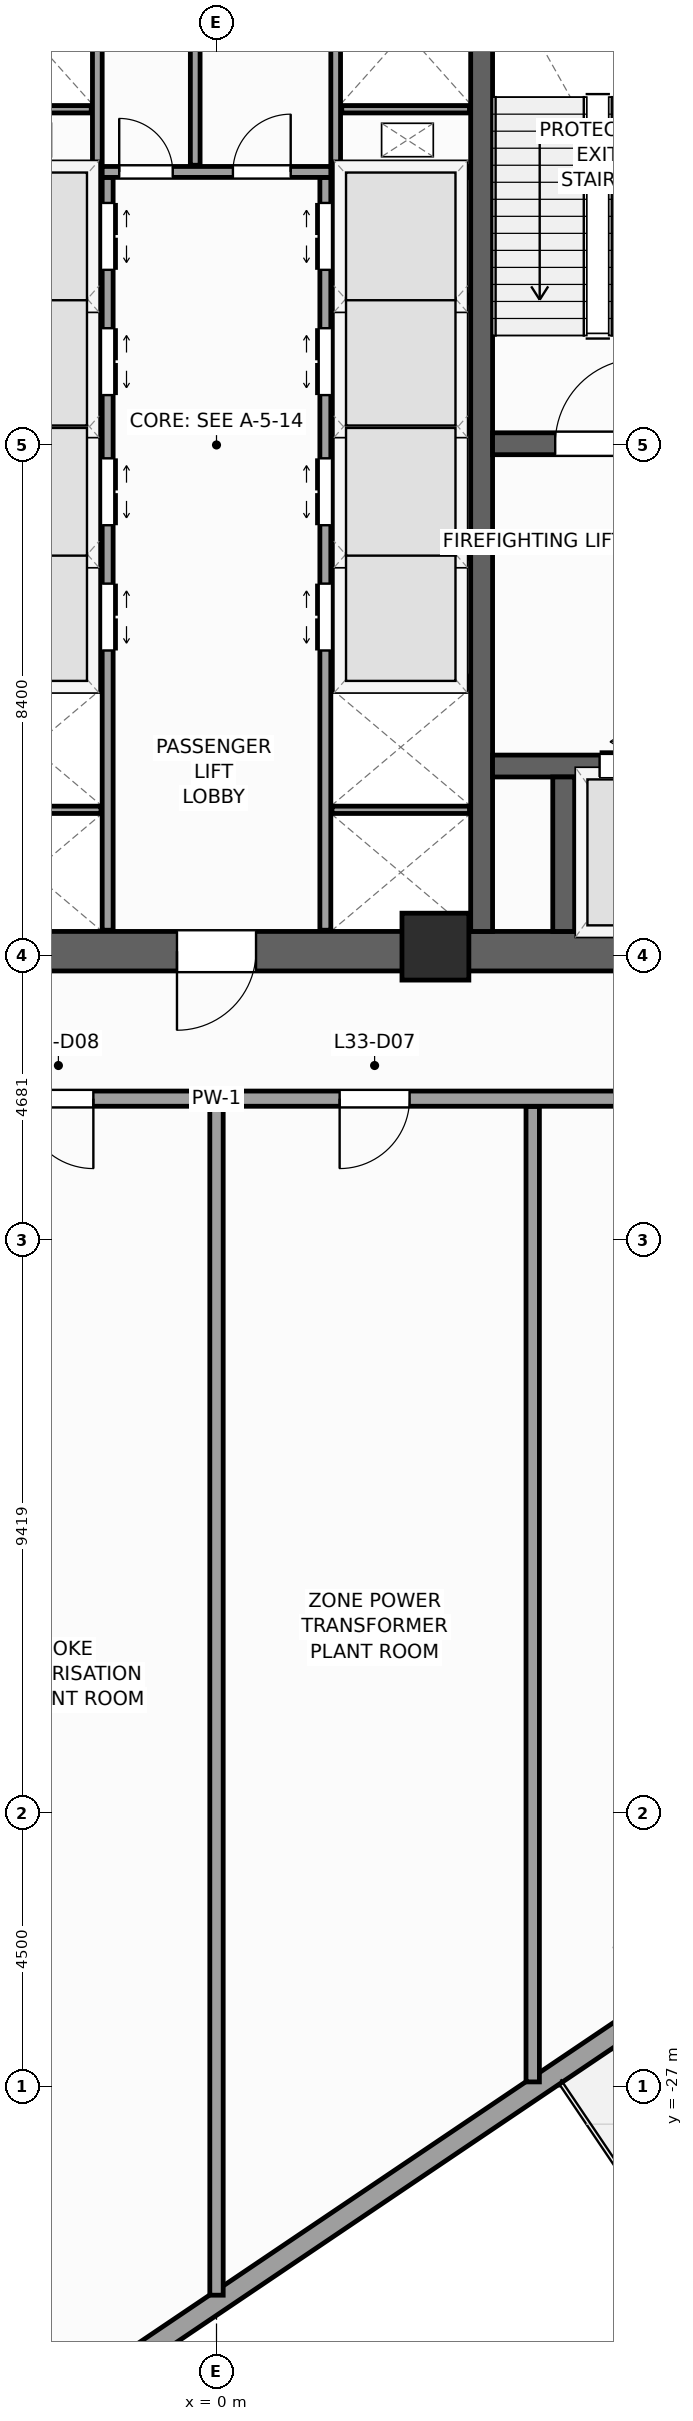
"""IFC4 building model, lengths in metres.
Left out: names, types, materials, properties, quantities, classifications, styles, units other than length and angle.
Written with IfcOpenShell. Run it as: python <this file> out.ifc"""

import sys

from ifc_helpers import new_model, si_unit, direction, frame, frame_2d, origin, origin_2d, place, context, subcontext, project, spatial, rectangle, extrude, source, transform, mapped, element, fill, save


model = new_model("IFC4")
c1 = context("Model", 3, precision=1e-05, world=origin(), true_north=direction((0.0, 1.0)))
c2 = subcontext(c1, "Body", "Model", "MODEL_VIEW")
j1 = project(units=[si_unit("LENGTHUNIT", "METRE"), si_unit("PLANEANGLEUNIT", "RADIAN")], contexts=[c1])
p1 = place(None, origin())
s1 = spatial("IfcSite", under=j1, at=p1, CompositionType="ELEMENT")
p2 = place(p1, origin())
s2 = spatial("IfcBuilding", under=s1, at=p2, CompositionType="ELEMENT")
p3 = place(p2, frame((0.0, 0.0, 139.2)))
s3 = spatial("IfcBuildingStorey", under=s2, at=p3, CompositionType="ELEMENT", Elevation=139.2)
p4 = place(p3, frame((-8.65, -8.325, 0.0), z_axis=(0.0, 0.0, 1.0), x_axis=(1.0, 0.0, 0.0)))
e1 = element("IfcWall", 1, at=p4, inside=s3, PredefinedType="SHEAR", context=c2, shape_type="SweptSolid", body=[
    extrude(rectangle(XDim=17.3, YDim=0.65, at=frame_2d((8.65, 0.0))), origin(), (0.0, 0.0, 1.0), 5.2),
])
p5 = place(p4, frame((8.0, 0.0, 0.0)))
e2 = element("IfcOpeningElement", 2, at=p5, cuts=e1, PredefinedType="OPENING", context=c2, shape_type="SweptSolid", body=[
    extrude(rectangle(XDim=1.3, YDim=2.2, at=frame_2d((0.65, 1.1))), frame((0.0, 0.335, 0.0), z_axis=(0.0, -1.0, 0.0), x_axis=(1.0, 0.0, 0.0)), (0.0, 0.0, 1.0), 0.67),
])
p6 = place(p3, frame((4.36, -8.0, 0.0), z_axis=(0.0, 0.0, 1.0), x_axis=(0.0, 1.0, 0.0)))
e3 = element("IfcWall", 3, at=p6, inside=s3, PredefinedType="SHEAR", context=c2, shape_type="SweptSolid", body=[
    extrude(rectangle(XDim=16.0, YDim=0.36, at=frame_2d((8.0, 0.0))), origin(), (0.0, 0.0, 1.0), 5.2),
])
p7 = place(p3, frame((4.54, 0.02, 0.0), z_axis=(0.0, 0.0, 1.0), x_axis=(1.0, 0.0, 0.0)))
e4 = element("IfcWall", 4, at=p7, inside=s3, PredefinedType="SHEAR", context=c2, shape_type="SweptSolid", body=[
    extrude(rectangle(XDim=3.46, YDim=0.36, at=frame_2d((1.73, 0.0))), origin(), (0.0, 0.0, 1.0), 5.2),
])
p8 = place(p7, frame((1.03, 0.0, 0.0)))
e5 = element("IfcOpeningElement", 5, at=p8, cuts=e4, PredefinedType="OPENING", context=c2, shape_type="SweptSolid", body=[
    extrude(rectangle(XDim=1.4, YDim=2.2, at=frame_2d((0.7, 1.1))), frame((0.0, 0.19, 0.0), z_axis=(0.0, -1.0, 0.0), x_axis=(1.0, 0.0, 0.0)), (0.0, 0.0, 1.0), 0.38),
])
p9 = place(p3, frame((4.54, -5.28, 0.0), z_axis=(0.0, 0.0, 1.0), x_axis=(1.0, 0.0, 0.0)))
e6 = element("IfcWall", 6, at=p9, inside=s3, PredefinedType="SHEAR", context=c2, shape_type="SweptSolid", body=[
    extrude(rectangle(XDim=3.46, YDim=0.36, at=frame_2d((1.73, 0.0))), origin(), (0.0, 0.0, 1.0), 5.2),
])
p10 = place(p9, frame((1.76, 0.0, 0.0)))
e7 = element("IfcOpeningElement", 7, at=p10, cuts=e6, PredefinedType="OPENING", context=c2, shape_type="SweptSolid", body=[
    extrude(rectangle(XDim=1.2, YDim=2.25, at=frame_2d((0.6, 1.125))), frame((0.0, 0.19, 0.0), z_axis=(0.0, -1.0, 0.0), x_axis=(1.0, 0.0, 0.0)), (0.0, 0.0, 1.0), 0.38),
])
p11 = place(p3, frame((5.71, -8.0, 0.0), z_axis=(0.0, 0.0, 1.0), x_axis=(0.0, 1.0, 0.0)))
e8 = element("IfcWall", 8, at=p11, inside=s3, PredefinedType="SHEAR", context=c2, shape_type="SweptSolid", body=[
    extrude(rectangle(XDim=2.54, YDim=0.36, at=frame_2d((1.27, 0.0))), origin(), (0.0, 0.0, 1.0), 5.2),
])
m1 = source(origin(), c2, "Body", "SweptSolid", [
    extrude(rectangle(XDim=1.1, YDim=1.1, at=origin_2d()), origin(), (0.0, 0.0, 1.0), 5.2),
])
p12 = place(p3, frame((3.6, -8.25, 0.0), z_axis=(0.0, 0.0, 1.0), x_axis=(1.0, 0.0, 0.0)))
e9 = element("IfcColumn", 9, at=p12, inside=s3, PredefinedType="PILASTER", context=c2, shape_type="MappedRepresentation", body=[
    mapped(m1, transform((0.0, 0.0, 0.0), scale=1.0)),
])
p13 = place(p3, frame((-5.486, -28.223, 0.0), z_axis=(0.0, 0.0, 1.0), x_axis=(0.559171107879, -0.82905227345, 0.0)))
e10 = element("IfcWall", 10, at=p13, inside=s3, PredefinedType="STANDARD", context=c2, shape_type="SweptSolid", body=[
    extrude(rectangle(XDim=5.17, YDim=0.34, at=frame_2d((2.585, 0.0))), origin(), (0.0, 0.0, 1.0), 4.24),
])
p14 = place(p3, frame((-2.972, -32.558, 0.0), z_axis=(0.0, 0.0, 1.0), x_axis=(0.82903231094, 0.559200704056, 0.0)))
e11 = element("IfcWall", 11, at=p14, inside=s3, PredefinedType="STANDARD", context=c2, shape_type="SweptSolid", body=[
    extrude(rectangle(XDim=15.27, YDim=0.34, at=frame_2d((7.635, 0.0))), origin(), (0.0, 0.0, 1.0), 4.34),
])
p15 = place(p14, frame((12.27, 0.0, 0.0)))
e12 = element("IfcOpeningElement", 12, at=p15, cuts=e11, PredefinedType="OPENING", context=c2, shape_type="SweptSolid", body=[
    extrude(rectangle(XDim=1.2, YDim=2.3, at=frame_2d((0.6, 1.15))), frame((0.0, 0.18, 0.0), z_axis=(0.0, -1.0, 0.0), x_axis=(1.0, 0.0, 0.0)), (0.0, 0.0, 1.0), 0.36),
])
p16 = place(p3, frame((-1.79, -7.98, 0.0), z_axis=(0.0, 0.0, 1.0), x_axis=(0.0, 1.0, 0.0)))
e13 = element("IfcWall", 13, at=p16, inside=s3, PredefinedType="PARTITIONING", context=c2, shape_type="SweptSolid", body=[
    extrude(rectangle(XDim=12.38, YDim=0.18, at=frame_2d((6.19, 0.0))), origin(), (0.0, 0.0, 1.0), 4.94),
])
p17 = place(p16, frame((4.6, 0.0, 0.0)))
e14 = element("IfcOpeningElement", 14, at=p17, cuts=e13, PredefinedType="OPENING", context=c2, shape_type="SweptSolid", body=[
    extrude(rectangle(XDim=1.1, YDim=2.2, at=frame_2d((0.55, 1.1))), frame((0.0, 0.1, 0.0), z_axis=(0.0, -1.0, 0.0), x_axis=(1.0, 0.0, 0.0)), (0.0, 0.0, 1.0), 0.2),
])
p18 = place(p16, frame((6.66, 0.0, 0.0)))
e15 = element("IfcOpeningElement", 15, at=p18, cuts=e13, PredefinedType="OPENING", context=c2, shape_type="SweptSolid", body=[
    extrude(rectangle(XDim=1.1, YDim=2.2, at=frame_2d((0.55, 1.1))), frame((0.0, 0.1, 0.0), z_axis=(0.0, -1.0, 0.0), x_axis=(1.0, 0.0, 0.0)), (0.0, 0.0, 1.0), 0.2),
])
p19 = place(p16, frame((8.8, 0.0, 0.0)))
e16 = element("IfcOpeningElement", 16, at=p19, cuts=e13, PredefinedType="OPENING", context=c2, shape_type="SweptSolid", body=[
    extrude(rectangle(XDim=1.1, YDim=2.2, at=frame_2d((0.55, 1.1))), frame((0.0, 0.1, 0.0), z_axis=(0.0, -1.0, 0.0), x_axis=(1.0, 0.0, 0.0)), (0.0, 0.0, 1.0), 0.2),
])
p20 = place(p16, frame((10.86, 0.0, 0.0)))
e17 = element("IfcOpeningElement", 17, at=p20, cuts=e13, PredefinedType="OPENING", context=c2, shape_type="SweptSolid", body=[
    extrude(rectangle(XDim=1.1, YDim=2.2, at=frame_2d((0.55, 1.1))), frame((0.0, 0.1, 0.0), z_axis=(0.0, -1.0, 0.0), x_axis=(1.0, 0.0, 0.0)), (0.0, 0.0, 1.0), 0.2),
])
p21 = place(p3, frame((1.79, -7.98, 0.0), z_axis=(0.0, 0.0, 1.0), x_axis=(0.0, 1.0, 0.0)))
e18 = element("IfcWall", 18, at=p21, inside=s3, PredefinedType="PARTITIONING", context=c2, shape_type="SweptSolid", body=[
    extrude(rectangle(XDim=12.38, YDim=0.18, at=frame_2d((6.19, 0.0))), origin(), (0.0, 0.0, 1.0), 4.94),
])
p22 = place(p21, frame((4.6, 0.0, 0.0)))
e19 = element("IfcOpeningElement", 19, at=p22, cuts=e18, PredefinedType="OPENING", context=c2, shape_type="SweptSolid", body=[
    extrude(rectangle(XDim=1.1, YDim=2.2, at=frame_2d((0.55, 1.1))), frame((0.0, 0.1, 0.0), z_axis=(0.0, -1.0, 0.0), x_axis=(1.0, 0.0, 0.0)), (0.0, 0.0, 1.0), 0.2),
])
p23 = place(p21, frame((6.66, 0.0, 0.0)))
e20 = element("IfcOpeningElement", 20, at=p23, cuts=e18, PredefinedType="OPENING", context=c2, shape_type="SweptSolid", body=[
    extrude(rectangle(XDim=1.1, YDim=2.2, at=frame_2d((0.55, 1.1))), frame((0.0, 0.1, 0.0), z_axis=(0.0, -1.0, 0.0), x_axis=(1.0, 0.0, 0.0)), (0.0, 0.0, 1.0), 0.2),
])
p24 = place(p21, frame((8.8, 0.0, 0.0)))
e21 = element("IfcOpeningElement", 21, at=p24, cuts=e18, PredefinedType="OPENING", context=c2, shape_type="SweptSolid", body=[
    extrude(rectangle(XDim=1.1, YDim=2.2, at=frame_2d((0.55, 1.1))), frame((0.0, 0.1, 0.0), z_axis=(0.0, -1.0, 0.0), x_axis=(1.0, 0.0, 0.0)), (0.0, 0.0, 1.0), 0.2),
])
p25 = place(p21, frame((10.86, 0.0, 0.0)))
e22 = element("IfcOpeningElement", 22, at=p25, cuts=e18, PredefinedType="OPENING", context=c2, shape_type="SweptSolid", body=[
    extrude(rectangle(XDim=1.1, YDim=2.2, at=frame_2d((0.55, 1.1))), frame((0.0, 0.1, 0.0), z_axis=(0.0, -1.0, 0.0), x_axis=(1.0, 0.0, 0.0)), (0.0, 0.0, 1.0), 0.2),
])
p26 = place(p3, frame((-1.88, 4.49, 0.0), z_axis=(0.0, 0.0, 1.0), x_axis=(1.0, 0.0, 0.0)))
e23 = element("IfcWall", 23, at=p26, inside=s3, PredefinedType="PARTITIONING", context=c2, shape_type="SweptSolid", body=[
    extrude(rectangle(XDim=3.76, YDim=0.18, at=frame_2d((1.88, 0.0))), origin(), (0.0, 0.0, 1.0), 4.94),
])
p27 = place(p26, frame((0.28, 0.0, 0.0)))
e24 = element("IfcOpeningElement", 24, at=p27, cuts=e23, PredefinedType="OPENING", context=c2, shape_type="SweptSolid", body=[
    extrude(rectangle(XDim=0.88, YDim=2.1, at=frame_2d((0.44, 1.05))), frame((0.0, 0.1, 0.0), z_axis=(0.0, -1.0, 0.0), x_axis=(1.0, 0.0, 0.0)), (0.0, 0.0, 1.0), 0.2),
])
p28 = place(p26, frame((2.15, 0.0, 0.0)))
e25 = element("IfcOpeningElement", 25, at=p28, cuts=e23, PredefinedType="OPENING", context=c2, shape_type="SweptSolid", body=[
    extrude(rectangle(XDim=0.95, YDim=2.1, at=frame_2d((0.475, 1.05))), frame((0.0, 0.1, 0.0), z_axis=(0.0, -1.0, 0.0), x_axis=(1.0, 0.0, 0.0)), (0.0, 0.0, 1.0), 0.2),
])
for number, where, z_axis, x_axis in (
    (26, (-4.17, -3.9, 0.0), (0.0, 0.0, 1.0), (1.0, 0.0, 0.0)),
    (27, (1.89, -3.9, 0.0), (0.0, 0.0, 1.0), (1.0, 0.0, 0.0)),
    (28, (-4.17, 0.3, 0.0), (0.0, 0.0, 1.0), (1.0, 0.0, 0.0)),
    (29, (1.89, 0.3, 0.0), (0.0, 0.0, 1.0), (1.0, 0.0, 0.0)),
    (30, (-4.17, 4.49, 0.0), (0.0, 0.0, 1.0), (1.0, 0.0, 0.0)),
    (31, (1.89, 4.49, 0.0), (0.0, 0.0, 1.0), (1.0, 0.0, 0.0)),
):
    element("IfcWall", number, at=place(p3, frame(where, z_axis=z_axis, x_axis=x_axis)), inside=s3, PredefinedType="PARTITIONING", context=c2, shape_type="SweptSolid", body=[
        extrude(rectangle(XDim=2.28, YDim=0.18, at=frame_2d((1.14, 0.0))), origin(), (0.0, 0.0, 1.0), 4.94),
    ])
for number, where, z_axis, x_axis in (
    (32, (-4.16, -6.0, 0.0), (0.0, 0.0, 1.0), (1.0, 0.0, 0.0)),
    (33, (1.9, -6.0, 0.0), (0.0, 0.0, 1.0), (1.0, 0.0, 0.0)),
    (34, (-4.16, -1.8, 0.0), (0.0, 0.0, 1.0), (1.0, 0.0, 0.0)),
    (35, (1.9, -1.8, 0.0), (0.0, 0.0, 1.0), (1.0, 0.0, 0.0)),
    (36, (-4.16, 2.4, 0.0), (0.0, 0.0, 1.0), (1.0, 0.0, 0.0)),
    (37, (1.9, 2.4, 0.0), (0.0, 0.0, 1.0), (1.0, 0.0, 0.0)),
):
    element("IfcWall", number, at=place(p3, frame(where, z_axis=z_axis, x_axis=x_axis)), inside=s3, PredefinedType="PARTITIONING", context=c2, shape_type="SweptSolid", body=[
        extrude(rectangle(XDim=2.26, YDim=0.12, at=frame_2d((1.13, 0.0))), origin(), (0.0, 0.0, 1.0), 4.94),
    ])
for number, where, z_axis, x_axis in (
    (38, (-1.96, 4.58, 0.0), (0.0, 0.0, 1.0), (0.0, 1.0, 0.0)),
    (39, (1.96, 4.58, 0.0), (0.0, 0.0, 1.0), (0.0, 1.0, 0.0)),
):
    element("IfcWall", number, at=place(p3, frame(where, z_axis=z_axis, x_axis=x_axis)), inside=s3, PredefinedType="PARTITIONING", context=c2, shape_type="SweptSolid", body=[
        extrude(rectangle(XDim=3.4, YDim=0.16, at=frame_2d((1.7, 0.0))), origin(), (0.0, 0.0, 1.0), 4.94),
    ])
for number, where, z_axis, x_axis in (
    (40, (-4.16, 5.52, 0.0), (0.0, 0.0, 1.0), (1.0, 0.0, 0.0)),
    (41, (2.06, 5.52, 0.0), (0.0, 0.0, 1.0), (1.0, 0.0, 0.0)),
):
    element("IfcWall", number, at=place(p3, frame(where, z_axis=z_axis, x_axis=x_axis)), inside=s3, PredefinedType="PARTITIONING", context=c2, shape_type="SweptSolid", body=[
        extrude(rectangle(XDim=2.1, YDim=0.12, at=frame_2d((1.05, 0.0))), origin(), (0.0, 0.0, 1.0), 4.94),
    ])
p29 = place(p3, frame((-0.35, 4.6, 0.0), z_axis=(0.0, 0.0, 1.0), x_axis=(0.0, 1.0, 0.0)))
e42 = element("IfcWall", 42, at=p29, inside=s3, PredefinedType="PARTITIONING", context=c2, shape_type="SweptSolid", body=[
    extrude(rectangle(XDim=3.38, YDim=0.16, at=frame_2d((1.69, 0.0))), origin(), (0.0, 0.0, 1.0), 4.94),
])
p30 = place(p3, frame((-10.75, -10.75, 0.0), z_axis=(0.0, 0.0, 1.0), x_axis=(1.0, 0.0, 0.0)))
e43 = element("IfcWall", 43, at=p30, inside=s3, PredefinedType="PARTITIONING", context=c2, shape_type="SweptSolid", body=[
    extrude(rectangle(XDim=21.5, YDim=0.25, at=frame_2d((10.75, 0.0))), origin(), (0.0, 0.0, 1.0), 4.94),
])
p31 = place(p30, frame((17.986, 0.0, 0.0)))
e44 = element("IfcOpeningElement", 44, at=p31, cuts=e43, PredefinedType="OPENING", context=c2, shape_type="SweptSolid", body=[
    extrude(rectangle(XDim=1.15, YDim=2.25, at=frame_2d((0.575, 1.125))), frame((0.0, 0.135, 0.0), z_axis=(0.0, -1.0, 0.0), x_axis=(1.0, 0.0, 0.0)), (0.0, 0.0, 1.0), 0.27),
])
p32 = place(p30, frame((12.775, 0.0, 0.0)))
e45 = element("IfcOpeningElement", 45, at=p32, cuts=e43, PredefinedType="OPENING", context=c2, shape_type="SweptSolid", body=[
    extrude(rectangle(XDim=1.15, YDim=2.25, at=frame_2d((0.575, 1.125))), frame((0.0, 0.135, 0.0), z_axis=(0.0, -1.0, 0.0), x_axis=(1.0, 0.0, 0.0)), (0.0, 0.0, 1.0), 0.27),
])
p33 = place(p30, frame((7.575, 0.0, 0.0)))
e46 = element("IfcOpeningElement", 46, at=p33, cuts=e43, PredefinedType="OPENING", context=c2, shape_type="SweptSolid", body=[
    extrude(rectangle(XDim=1.15, YDim=2.25, at=frame_2d((0.575, 1.125))), frame((0.0, 0.135, 0.0), z_axis=(0.0, -1.0, 0.0), x_axis=(1.0, 0.0, 0.0)), (0.0, 0.0, 1.0), 0.27),
])
p34 = place(p30, frame((2.365, 0.0, 0.0)))
e47 = element("IfcOpeningElement", 47, at=p34, cuts=e43, PredefinedType="OPENING", context=c2, shape_type="SweptSolid", body=[
    extrude(rectangle(XDim=1.15, YDim=2.25, at=frame_2d((0.575, 1.125))), frame((0.0, 0.135, 0.0), z_axis=(0.0, -1.0, 0.0), x_axis=(1.0, 0.0, 0.0)), (0.0, 0.0, 1.0), 0.27),
])
p35 = place(p3, frame((0.0, -10.88, 0.0), z_axis=(0.0, 0.0, 1.0), x_axis=(0.0, -1.0, 0.0)))
e48 = element("IfcWall", 48, at=p35, inside=s3, PredefinedType="PARTITIONING", context=c2, shape_type="SweptSolid", body=[
    extrude(rectangle(XDim=19.547, YDim=0.22, at=frame_2d((9.773, 0.0))), origin(), (0.0, 0.0, 1.0), 4.94),
])
p36 = place(p3, frame((5.2, -10.88, 0.0), z_axis=(0.0, 0.0, 1.0), x_axis=(0.0, -1.0, 0.0)))
e49 = element("IfcWall", 49, at=p36, inside=s3, PredefinedType="PARTITIONING", context=c2, shape_type="SweptSolid", body=[
    extrude(rectangle(XDim=16.04, YDim=0.22, at=frame_2d((8.02, 0.0))), origin(), (0.0, 0.0, 1.0), 4.94),
])
m2 = source(origin(), c2, "Body", "SweptSolid", [
    extrude(rectangle(XDim=1.4, YDim=2.2, at=frame_2d((0.7, 1.1))), frame((0.0, 0.025, 0.0), z_axis=(0.0, -1.0, 0.0), x_axis=(1.0, 0.0, 0.0)), (0.0, 0.0, 1.0), 0.05),
])
p37 = place(p8, origin())
e50 = element("IfcDoor", 50, at=p37, inside=s3, OperationType="SINGLE_SWING_RIGHT", PredefinedType="DOOR", context=c2, shape_type="MappedRepresentation", body=[
    mapped(m2, transform((0.0, 0.0, 0.0), scale=1.0)),
])
fill(e5, e50)
m3 = source(origin(), c2, "Body", "SweptSolid", [
    extrude(rectangle(XDim=1.3, YDim=2.2, at=frame_2d((0.65, 1.1))), frame((0.0, 0.025, 0.0), z_axis=(0.0, -1.0, 0.0), x_axis=(1.0, 0.0, 0.0)), (0.0, 0.0, 1.0), 0.05),
])
p38 = place(p5, frame((1.3, 0.0, 0.0), z_axis=(0.0, 0.0, 1.0), x_axis=(-1.0, 0.0, 0.0)))
e51 = element("IfcDoor", 51, at=p38, inside=s3, OperationType="SINGLE_SWING_LEFT", PredefinedType="DOOR", context=c2, shape_type="MappedRepresentation", body=[
    mapped(m3, transform((0.0, 0.0, 0.0), scale=1.0)),
])
fill(e2, e51)
m4 = source(origin(), c2, "Body", "SweptSolid", [
    extrude(rectangle(XDim=1.2, YDim=2.25, at=frame_2d((0.6, 1.125))), frame((0.0, 0.025, 0.0), z_axis=(0.0, -1.0, 0.0), x_axis=(1.0, 0.0, 0.0)), (0.0, 0.0, 1.0), 0.05),
])
p39 = place(p10, origin())
e52 = element("IfcDoor", 52, at=p39, inside=s3, OperationType="DOUBLE_DOOR_SLIDING", PredefinedType="DOOR", context=c2, shape_type="MappedRepresentation", body=[
    mapped(m4, transform((0.0, 0.0, 0.0), scale=1.0)),
])
fill(e7, e52)
m5 = source(origin(), c2, "Body", "SweptSolid", [
    extrude(rectangle(XDim=1.1, YDim=2.2, at=frame_2d((0.55, 1.1))), frame((0.0, 0.025, 0.0), z_axis=(0.0, -1.0, 0.0), x_axis=(1.0, 0.0, 0.0)), (0.0, 0.0, 1.0), 0.05),
])
p40 = place(p17, frame((1.1, 0.0, 0.0), z_axis=(0.0, 0.0, 1.0), x_axis=(-1.0, 0.0, 0.0)))
e53 = element("IfcDoor", 53, at=p40, inside=s3, OperationType="DOUBLE_DOOR_SLIDING", PredefinedType="DOOR", context=c2, shape_type="MappedRepresentation", body=[
    mapped(m5, transform((0.0, 0.0, 0.0), scale=1.0)),
])
fill(e14, e53)
p41 = place(p18, frame((1.1, 0.0, 0.0), z_axis=(0.0, 0.0, 1.0), x_axis=(-1.0, 0.0, 0.0)))
e54 = element("IfcDoor", 54, at=p41, inside=s3, OperationType="DOUBLE_DOOR_SLIDING", PredefinedType="DOOR", context=c2, shape_type="MappedRepresentation", body=[
    mapped(m5, transform((0.0, 0.0, 0.0), scale=1.0)),
])
fill(e15, e54)
p42 = place(p22, origin())
e55 = element("IfcDoor", 55, at=p42, inside=s3, OperationType="DOUBLE_DOOR_SLIDING", PredefinedType="DOOR", context=c2, shape_type="MappedRepresentation", body=[
    mapped(m5, transform((0.0, 0.0, 0.0), scale=1.0)),
])
fill(e19, e55)
p43 = place(p23, origin())
e56 = element("IfcDoor", 56, at=p43, inside=s3, OperationType="DOUBLE_DOOR_SLIDING", PredefinedType="DOOR", context=c2, shape_type="MappedRepresentation", body=[
    mapped(m5, transform((0.0, 0.0, 0.0), scale=1.0)),
])
fill(e20, e56)
p44 = place(p19, frame((1.1, 0.0, 0.0), z_axis=(0.0, 0.0, 1.0), x_axis=(-1.0, 0.0, 0.0)))
e57 = element("IfcDoor", 57, at=p44, inside=s3, OperationType="DOUBLE_DOOR_SLIDING", PredefinedType="DOOR", context=c2, shape_type="MappedRepresentation", body=[
    mapped(m5, transform((0.0, 0.0, 0.0), scale=1.0)),
])
fill(e16, e57)
p45 = place(p20, frame((1.1, 0.0, 0.0), z_axis=(0.0, 0.0, 1.0), x_axis=(-1.0, 0.0, 0.0)))
e58 = element("IfcDoor", 58, at=p45, inside=s3, OperationType="DOUBLE_DOOR_SLIDING", PredefinedType="DOOR", context=c2, shape_type="MappedRepresentation", body=[
    mapped(m5, transform((0.0, 0.0, 0.0), scale=1.0)),
])
fill(e17, e58)
p46 = place(p24, origin())
e59 = element("IfcDoor", 59, at=p46, inside=s3, OperationType="DOUBLE_DOOR_SLIDING", PredefinedType="DOOR", context=c2, shape_type="MappedRepresentation", body=[
    mapped(m5, transform((0.0, 0.0, 0.0), scale=1.0)),
])
fill(e21, e59)
p47 = place(p25, origin())
e60 = element("IfcDoor", 60, at=p47, inside=s3, OperationType="DOUBLE_DOOR_SLIDING", PredefinedType="DOOR", context=c2, shape_type="MappedRepresentation", body=[
    mapped(m5, transform((0.0, 0.0, 0.0), scale=1.0)),
])
fill(e22, e60)
m6 = source(origin(), c2, "Body", "SweptSolid", [
    extrude(rectangle(XDim=0.88, YDim=2.1, at=frame_2d((0.44, 1.05))), frame((0.0, 0.025, 0.0), z_axis=(0.0, -1.0, 0.0), x_axis=(1.0, 0.0, 0.0)), (0.0, 0.0, 1.0), 0.05),
])
p48 = place(p27, origin())
e61 = element("IfcDoor", 61, at=p48, inside=s3, OperationType="SINGLE_SWING_LEFT", PredefinedType="DOOR", context=c2, shape_type="MappedRepresentation", body=[
    mapped(m6, transform((0.0, 0.0, 0.0), scale=1.0)),
])
fill(e24, e61)
m7 = source(origin(), c2, "Body", "SweptSolid", [
    extrude(rectangle(XDim=0.95, YDim=2.1, at=frame_2d((0.475, 1.05))), frame((0.0, 0.025, 0.0), z_axis=(0.0, -1.0, 0.0), x_axis=(1.0, 0.0, 0.0)), (0.0, 0.0, 1.0), 0.05),
])
p49 = place(p28, origin())
e62 = element("IfcDoor", 62, at=p49, inside=s3, OperationType="SINGLE_SWING_RIGHT", PredefinedType="DOOR", context=c2, shape_type="MappedRepresentation", body=[
    mapped(m7, transform((0.0, 0.0, 0.0), scale=1.0)),
])
fill(e25, e62)
m8 = source(origin(), c2, "Body", "SweptSolid", [
    extrude(rectangle(XDim=1.15, YDim=2.25, at=frame_2d((0.575, 1.125))), frame((0.0, 0.025, 0.0), z_axis=(0.0, -1.0, 0.0), x_axis=(1.0, 0.0, 0.0)), (0.0, 0.0, 1.0), 0.05),
])
p50 = place(p32, frame((1.15, 0.0, 0.0), z_axis=(0.0, 0.0, 1.0), x_axis=(-1.0, 0.0, 0.0)))
e63 = element("IfcDoor", 63, at=p50, inside=s3, OperationType="SINGLE_SWING_LEFT", PredefinedType="DOOR", context=c2, shape_type="MappedRepresentation", body=[
    mapped(m8, transform((0.0, 0.0, 0.0), scale=1.0)),
])
fill(e45, e63)
p51 = place(p33, frame((1.15, 0.0, 0.0), z_axis=(0.0, 0.0, 1.0), x_axis=(-1.0, 0.0, 0.0)))
e64 = element("IfcDoor", 64, at=p51, inside=s3, OperationType="SINGLE_SWING_RIGHT", PredefinedType="DOOR", context=c2, shape_type="MappedRepresentation", body=[
    mapped(m8, transform((0.0, 0.0, 0.0), scale=1.0)),
])
fill(e46, e64)
save(model, sys.argv[1])
